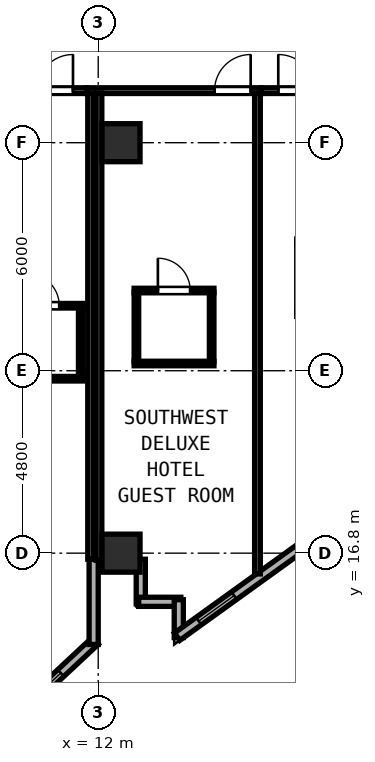
"""IFC4 building model, lengths in metres.
Left out: names, types, materials, properties, quantities, classifications, styles, units other than length and angle.
Written with IfcOpenShell. Run it as: python <this file> out.ifc"""

import sys

from ifc_helpers import new_model, si_unit, direction, frame, frame_2d, origin, origin_2d, place, context, subcontext, project, spatial, rectangle, hollow_rectangle, extrude, element, fill, save


model = new_model("IFC4")
c1 = context("Model", 3, precision=1e-05, world=origin(), true_north=direction((0.0, 1.0)))
c2 = subcontext(c1, "Body", "Model", "MODEL_VIEW")
j1 = project(units=[si_unit("LENGTHUNIT", "METRE"), si_unit("PLANEANGLEUNIT", "RADIAN")], contexts=[c1])
p1 = place(None, origin())
s1 = spatial("IfcSite", under=j1, at=p1, CompositionType="ELEMENT")
p2 = place(p1, origin())
s2 = spatial("IfcBuilding", under=s1, at=p2, CompositionType="ELEMENT")
p3 = place(p2, frame((0.0, 0.0, 152.4)))
s3 = spatial("IfcBuildingStorey", under=s2, at=p3, CompositionType="ELEMENT", Elevation=152.4)
for number, where, z_axis, x_axis in (
    (1, (12.6, 16.8, 0.0), (0.0, 0.0, 1.0), (1.0, 0.0, 0.0)),
    (2, (12.6, 27.6, 0.0), (0.0, 0.0, 1.0), (1.0, 0.0, 0.0)),
):
    element("IfcColumn", number, at=place(p3, frame(where, z_axis=z_axis, x_axis=x_axis)), inside=s3, PredefinedType="COLUMN", context=c2, shape_type="SweptSolid", body=[
        extrude(hollow_rectangle(XDim=1.0, YDim=1.0, WallThickness=0.038, at=origin_2d()), origin(), (0.0, 0.0, 1.0), 3.8),
    ])
p4 = place(p3, frame((13.12, 16.64, 0.0), z_axis=(0.0, 0.0, 1.0), x_axis=(0.0, -1.0, 0.0)))
e3 = element("IfcWall", 3, at=p4, inside=s3, PredefinedType="SOLIDWALL", context=c2, shape_type="SweptSolid", body=[
    extrude(rectangle(XDim=1.175, YDim=0.24, at=frame_2d((0.587, 0.0))), origin(), (0.0, 0.0, 1.0), 3.6),
])
p5 = place(p3, frame((13.065, 15.52, 0.0), z_axis=(0.0, 0.0, 1.0), x_axis=(1.0, 0.0, 0.0)))
e4 = element("IfcWall", 4, at=p5, inside=s3, PredefinedType="SOLIDWALL", context=c2, shape_type="SweptSolid", body=[
    extrude(rectangle(XDim=1.11, YDim=0.24, at=frame_2d((0.555, 0.0))), origin(), (0.0, 0.0, 1.0), 3.6),
])
p6 = place(p3, frame((14.12, 15.575, 0.0), z_axis=(0.0, 0.0, 1.0), x_axis=(0.0, -1.0, 0.0)))
e5 = element("IfcWall", 5, at=p6, inside=s3, PredefinedType="SOLIDWALL", context=c2, shape_type="SweptSolid", body=[
    extrude(rectangle(XDim=0.996, YDim=0.24, at=frame_2d((0.498, 0.0))), origin(), (0.0, 0.0, 1.0), 3.6),
])
p7 = place(p3, frame((14.075, 14.602, 0.0), z_axis=(0.0, 0.0, 1.0), x_axis=(0.811543504691, 0.584291998913, 0.0)))
e6 = element("IfcWall", 6, at=p7, inside=s3, PredefinedType="SOLIDWALL", context=c2, shape_type="SweptSolid", body=[
    extrude(rectangle(XDim=11.623, YDim=0.24, at=frame_2d((5.812, 0.0))), origin(), (0.0, 0.0, 1.0), 3.145),
])
p8 = place(p7, frame((0.7, 0.0, 0.85)))
e7 = element("IfcOpeningElement", 7, at=p8, cuts=e6, PredefinedType="OPENING", context=c2, shape_type="SweptSolid", body=[
    extrude(rectangle(XDim=1.15, YDim=1.8, at=frame_2d((0.575, 0.9))), frame((0.0, 0.13, 0.0), z_axis=(0.0, -1.0, 0.0), x_axis=(1.0, 0.0, 0.0)), (0.0, 0.0, 1.0), 0.26),
])
p9 = place(p7, frame((6.1, 0.0, 0.85)))
e8 = element("IfcOpeningElement", 8, at=p9, cuts=e6, PredefinedType="OPENING", context=c2, shape_type="SweptSolid", body=[
    extrude(rectangle(XDim=1.15, YDim=1.8, at=frame_2d((0.575, 0.9))), frame((0.0, 0.13, 0.0), z_axis=(0.0, -1.0, 0.0), x_axis=(1.0, 0.0, 0.0)), (0.0, 0.0, 1.0), 0.26),
])
p10 = place(p7, frame((9.141, 0.0, 0.85)))
e9 = element("IfcOpeningElement", 9, at=p10, cuts=e6, PredefinedType="OPENING", context=c2, shape_type="SweptSolid", body=[
    extrude(rectangle(XDim=1.15, YDim=1.8, at=frame_2d((0.575, 0.9))), frame((0.0, 0.13, 0.0), z_axis=(0.0, -1.0, 0.0), x_axis=(1.0, 0.0, 0.0)), (0.0, 0.0, 1.0), 0.26),
])
p11 = place(p3, frame((3.27, 6.416, 0.0), z_axis=(0.0, 0.0, 1.0), x_axis=(0.731064187858, 0.682308693505, 0.0)))
e10 = element("IfcWall", 10, at=p11, inside=s3, PredefinedType="SOLIDWALL", context=c2, shape_type="SweptSolid", body=[
    extrude(rectangle(XDim=11.833, YDim=0.24, at=frame_2d((5.916, 0.0))), origin(), (0.0, 0.0, 1.0), 3.6),
])
p12 = place(p11, frame((0.7, 0.0, 0.85)))
e11 = element("IfcOpeningElement", 11, at=p12, cuts=e10, PredefinedType="OPENING", context=c2, shape_type="SweptSolid", body=[
    extrude(rectangle(XDim=1.15, YDim=1.8, at=frame_2d((0.575, 0.9))), frame((0.0, 0.13, 0.0), z_axis=(0.0, -1.0, 0.0), x_axis=(1.0, 0.0, 0.0)), (0.0, 0.0, 1.0), 0.26),
])
p13 = place(p11, frame((6.1, 0.0, 0.85)))
e12 = element("IfcOpeningElement", 12, at=p13, cuts=e10, PredefinedType="OPENING", context=c2, shape_type="SweptSolid", body=[
    extrude(rectangle(XDim=1.15, YDim=1.8, at=frame_2d((0.575, 0.9))), frame((0.0, 0.13, 0.0), z_axis=(0.0, -1.0, 0.0), x_axis=(1.0, 0.0, 0.0)), (0.0, 0.0, 1.0), 0.26),
])
p14 = place(p11, frame((9.446, 0.0, 0.85)))
e13 = element("IfcOpeningElement", 13, at=p14, cuts=e10, PredefinedType="OPENING", context=c2, shape_type="SweptSolid", body=[
    extrude(rectangle(XDim=1.15, YDim=1.8, at=frame_2d((0.575, 0.9))), frame((0.0, 0.13, 0.0), z_axis=(0.0, -1.0, 0.0), x_axis=(1.0, 0.0, 0.0)), (0.0, 0.0, 1.0), 0.26),
])
p15 = place(p3, frame((11.88, 14.397, 0.0), z_axis=(0.0, 0.0, 1.0), x_axis=(0.0, 1.0, 0.0)))
e14 = element("IfcWall", 14, at=p15, inside=s3, PredefinedType="SOLIDWALL", context=c2, shape_type="SweptSolid", body=[
    extrude(rectangle(XDim=2.243, YDim=0.24, at=frame_2d((1.121, 0.0))), origin(), (0.0, 0.0, 1.0), 3.6),
])
p16 = place(p3, frame((11.7, 28.97, 0.0), z_axis=(0.0, 0.0, 1.0), x_axis=(1.0, 0.0, 0.0)))
e15 = element("IfcWall", 15, at=p16, inside=s3, PredefinedType="PARTITIONING", context=c2, shape_type="SweptSolid", body=[
    extrude(rectangle(XDim=4.59, YDim=0.15, at=frame_2d((2.295, 0.0))), origin(), (0.0, 0.0, 1.0), 3.6),
])
p17 = place(p16, frame((4.311, 0.0, 0.0), z_axis=(0.0, 0.0, 1.0), x_axis=(-1.0, 0.0, 0.0)))
e16 = element("IfcOpeningElement", 16, at=p17, cuts=e15, PredefinedType="OPENING", context=c2, shape_type="SweptSolid", body=[
    extrude(rectangle(XDim=0.95, YDim=2.15, at=frame_2d((0.475, 1.075))), frame((0.0, 0.085, 0.0), z_axis=(0.0, -1.0, 0.0), x_axis=(1.0, 0.0, 0.0)), (0.0, 0.0, 1.0), 0.17),
])
p18 = place(p3, frame((11.8, 16.642, 0.0), z_axis=(0.0, 0.0, 1.0), x_axis=(0.0, 1.0, 0.0)))
e17 = element("IfcWall", 17, at=p18, inside=s3, PredefinedType="PARTITIONING", context=c2, shape_type="SweptSolid", body=[
    extrude(rectangle(XDim=12.268, YDim=0.15, at=frame_2d((6.134, 0.0))), origin(), (0.0, 0.0, 1.0), 3.6),
])
p19 = place(p3, frame((16.19, 16.254, 0.0), z_axis=(0.0, 0.0, 1.0), x_axis=(0.0, 1.0, 0.0)))
e18 = element("IfcWall", 18, at=p19, inside=s3, PredefinedType="PARTITIONING", context=c2, shape_type="SweptSolid", body=[
    extrude(rectangle(XDim=12.656, YDim=0.15, at=frame_2d((6.328, 0.0))), origin(), (0.0, 0.0, 1.0), 3.6),
])
p20 = place(p3, frame((12.945, 23.71, 0.0), z_axis=(0.0, 0.0, 1.0), x_axis=(1.0, 0.0, 0.0)))
e19 = element("IfcWall", 19, at=p20, inside=s3, PredefinedType="PARTITIONING", context=c2, shape_type="SweptSolid", body=[
    extrude(rectangle(XDim=2.1, YDim=0.12, at=frame_2d((1.05, 0.0))), origin(), (0.0, 0.0, 1.0), 3.6),
])
p21 = place(p20, frame((1.475, 0.0, 0.0), z_axis=(0.0, 0.0, 1.0), x_axis=(-1.0, 0.0, 0.0)))
e20 = element("IfcOpeningElement", 20, at=p21, cuts=e19, PredefinedType="OPENING", context=c2, shape_type="SweptSolid", body=[
    extrude(rectangle(XDim=0.85, YDim=2.1, at=frame_2d((0.425, 1.05))), frame((0.0, 0.07, 0.0), z_axis=(0.0, -1.0, 0.0), x_axis=(1.0, 0.0, 0.0)), (0.0, 0.0, 1.0), 0.14),
])
p22 = place(p3, frame((12.945, 21.79, 0.0), z_axis=(0.0, 0.0, 1.0), x_axis=(1.0, 0.0, 0.0)))
e21 = element("IfcWall", 21, at=p22, inside=s3, PredefinedType="PARTITIONING", context=c2, shape_type="SweptSolid", body=[
    extrude(rectangle(XDim=2.1, YDim=0.12, at=frame_2d((1.05, 0.0))), origin(), (0.0, 0.0, 1.0), 3.6),
])
for number, where, z_axis, x_axis in (
    (22, (13.005, 21.835, 0.0), (0.0, 0.0, 1.0), (0.0, 1.0, 0.0)),
    (23, (14.985, 21.835, 0.0), (0.0, 0.0, 1.0), (0.0, 1.0, 0.0)),
):
    element("IfcWall", number, at=place(p3, frame(where, z_axis=z_axis, x_axis=x_axis)), inside=s3, PredefinedType="PARTITIONING", context=c2, shape_type="SweptSolid", body=[
        extrude(rectangle(XDim=1.83, YDim=0.12, at=frame_2d((0.915, 0.0))), origin(), (0.0, 0.0, 1.0), 3.6),
    ])
p23 = place(p3, frame((16.292, 28.97, 0.0), z_axis=(0.0, 0.0, 1.0), x_axis=(1.0, 0.0, 0.0)))
e24 = element("IfcWall", 24, at=p23, inside=s3, PredefinedType="PARTITIONING", context=c2, shape_type="SweptSolid", body=[
    extrude(rectangle(XDim=4.148, YDim=0.15, at=frame_2d((2.074, 0.0))), origin(), (0.0, 0.0, 1.0), 3.6),
])
p24 = place(p23, frame((1.396, 0.0, 0.0), z_axis=(0.0, 0.0, 1.0), x_axis=(-1.0, 0.0, 0.0)))
e25 = element("IfcOpeningElement", 25, at=p24, cuts=e24, PredefinedType="OPENING", context=c2, shape_type="SweptSolid", body=[
    extrude(rectangle(XDim=0.95, YDim=2.15, at=frame_2d((0.475, 1.075))), frame((0.0, 0.085, 0.0), z_axis=(0.0, -1.0, 0.0), x_axis=(1.0, 0.0, 0.0)), (0.0, 0.0, 1.0), 0.17),
])
p25 = place(p3, frame((9.402, 28.97, 0.0), z_axis=(0.0, 0.0, 1.0), x_axis=(1.0, 0.0, 0.0)))
e26 = element("IfcWall", 26, at=p25, inside=s3, PredefinedType="PARTITIONING", context=c2, shape_type="SweptSolid", body=[
    extrude(rectangle(XDim=2.296, YDim=0.15, at=frame_2d((1.148, 0.0))), origin(), (0.0, 0.0, 1.0), 3.6),
])
p26 = place(p25, frame((1.934, 0.0, 0.0), z_axis=(0.0, 0.0, 1.0), x_axis=(-1.0, 0.0, 0.0)))
e27 = element("IfcOpeningElement", 27, at=p26, cuts=e26, PredefinedType="OPENING", context=c2, shape_type="SweptSolid", body=[
    extrude(rectangle(XDim=0.95, YDim=2.15, at=frame_2d((0.475, 1.075))), frame((0.0, 0.085, 0.0), z_axis=(0.0, -1.0, 0.0), x_axis=(1.0, 0.0, 0.0)), (0.0, 0.0, 1.0), 0.17),
])
p27 = place(p3, frame((12.02, 16.612, 0.0), z_axis=(0.0, 0.0, 1.0), x_axis=(0.0, 1.0, 0.0)))
e28 = element("IfcWall", 28, at=p27, inside=s3, PredefinedType="PARTITIONING", context=c2, shape_type="SweptSolid", body=[
    extrude(rectangle(XDim=12.298, YDim=0.15, at=frame_2d((6.149, 0.0))), origin(), (0.0, 0.0, 1.0), 3.6),
])
p28 = place(p3, frame((9.5, 23.31, 0.0), z_axis=(0.0, 0.0, 1.0), x_axis=(1.0, 0.0, 0.0)))
e29 = element("IfcWall", 29, at=p28, inside=s3, PredefinedType="PARTITIONING", context=c2, shape_type="SweptSolid", body=[
    extrude(rectangle(XDim=2.1, YDim=0.12, at=frame_2d((1.05, 0.0))), origin(), (0.0, 0.0, 1.0), 3.6),
])
p29 = place(p28, frame((1.475, 0.0, 0.0), z_axis=(0.0, 0.0, 1.0), x_axis=(-1.0, 0.0, 0.0)))
e30 = element("IfcOpeningElement", 30, at=p29, cuts=e29, PredefinedType="OPENING", context=c2, shape_type="SweptSolid", body=[
    extrude(rectangle(XDim=0.85, YDim=2.1, at=frame_2d((0.425, 1.05))), frame((0.0, 0.07, 0.0), z_axis=(0.0, -1.0, 0.0), x_axis=(1.0, 0.0, 0.0)), (0.0, 0.0, 1.0), 0.14),
])
p30 = place(p3, frame((9.5, 21.39, 0.0), z_axis=(0.0, 0.0, 1.0), x_axis=(1.0, 0.0, 0.0)))
e31 = element("IfcWall", 31, at=p30, inside=s3, PredefinedType="PARTITIONING", context=c2, shape_type="SweptSolid", body=[
    extrude(rectangle(XDim=2.1, YDim=0.12, at=frame_2d((1.05, 0.0))), origin(), (0.0, 0.0, 1.0), 3.6),
])
p31 = place(p3, frame((11.54, 21.435, 0.0), z_axis=(0.0, 0.0, 1.0), x_axis=(0.0, 1.0, 0.0)))
e32 = element("IfcWall", 32, at=p31, inside=s3, PredefinedType="PARTITIONING", context=c2, shape_type="SweptSolid", body=[
    extrude(rectangle(XDim=1.83, YDim=0.12, at=frame_2d((0.915, 0.0))), origin(), (0.0, 0.0, 1.0), 3.6),
])
p32 = place(p8, origin())
e33 = element("IfcWindow", 33, at=p32, inside=s3, PartitioningType="SINGLE_PANEL", PredefinedType="WINDOW", context=c2, shape_type="SweptSolid", body=[
    extrude(rectangle(XDim=1.15, YDim=1.8, at=frame_2d((0.575, 0.9))), frame((0.0, 0.03, 0.0), z_axis=(0.0, -1.0, 0.0), x_axis=(1.0, 0.0, 0.0)), (0.0, 0.0, 1.0), 0.06),
])
fill(e7, e33)
p33 = place(p17, origin())
e34 = element("IfcDoor", 34, at=p33, inside=s3, OperationType="SINGLE_SWING_LEFT", PredefinedType="DOOR", context=c2, shape_type="SweptSolid", body=[
    extrude(rectangle(XDim=0.95, YDim=2.15, at=frame_2d((0.475, 1.075))), frame((0.0, 0.025, 0.0), z_axis=(0.0, -1.0, 0.0), x_axis=(1.0, 0.0, 0.0)), (0.0, 0.0, 1.0), 0.05),
])
fill(e16, e34)
p34 = place(p21, origin())
e35 = element("IfcDoor", 35, at=p34, inside=s3, OperationType="SINGLE_SWING_RIGHT", PredefinedType="DOOR", context=c2, shape_type="SweptSolid", body=[
    extrude(rectangle(XDim=0.85, YDim=2.1, at=frame_2d((0.425, 1.05))), frame((0.0, 0.025, 0.0), z_axis=(0.0, -1.0, 0.0), x_axis=(1.0, 0.0, 0.0)), (0.0, 0.0, 1.0), 0.05),
])
fill(e20, e35)
p35 = place(p24, origin())
e36 = element("IfcDoor", 36, at=p35, inside=s3, OperationType="SINGLE_SWING_RIGHT", PredefinedType="DOOR", context=c2, shape_type="SweptSolid", body=[
    extrude(rectangle(XDim=0.95, YDim=2.15, at=frame_2d((0.475, 1.075))), frame((0.0, 0.025, 0.0), z_axis=(0.0, -1.0, 0.0), x_axis=(1.0, 0.0, 0.0)), (0.0, 0.0, 1.0), 0.05),
])
fill(e25, e36)
p36 = place(p26, origin())
e37 = element("IfcDoor", 37, at=p36, inside=s3, OperationType="SINGLE_SWING_LEFT", PredefinedType="DOOR", context=c2, shape_type="SweptSolid", body=[
    extrude(rectangle(XDim=0.95, YDim=2.15, at=frame_2d((0.475, 1.075))), frame((0.0, 0.025, 0.0), z_axis=(0.0, -1.0, 0.0), x_axis=(1.0, 0.0, 0.0)), (0.0, 0.0, 1.0), 0.05),
])
fill(e27, e37)
p37 = place(p29, origin())
e38 = element("IfcDoor", 38, at=p37, inside=s3, OperationType="SINGLE_SWING_RIGHT", PredefinedType="DOOR", context=c2, shape_type="SweptSolid", body=[
    extrude(rectangle(XDim=0.85, YDim=2.1, at=frame_2d((0.425, 1.05))), frame((0.0, 0.025, 0.0), z_axis=(0.0, -1.0, 0.0), x_axis=(1.0, 0.0, 0.0)), (0.0, 0.0, 1.0), 0.05),
])
fill(e30, e38)
p38 = place(p14, origin())
e39 = element("IfcWindow", 39, at=p38, inside=s3, PartitioningType="SINGLE_PANEL", PredefinedType="WINDOW", context=c2, shape_type="SweptSolid", body=[
    extrude(rectangle(XDim=1.15, YDim=1.8, at=frame_2d((0.575, 0.9))), frame((0.0, 0.03, 0.0), z_axis=(0.0, -1.0, 0.0), x_axis=(1.0, 0.0, 0.0)), (0.0, 0.0, 1.0), 0.06),
])
fill(e13, e39)
save(model, sys.argv[1])
